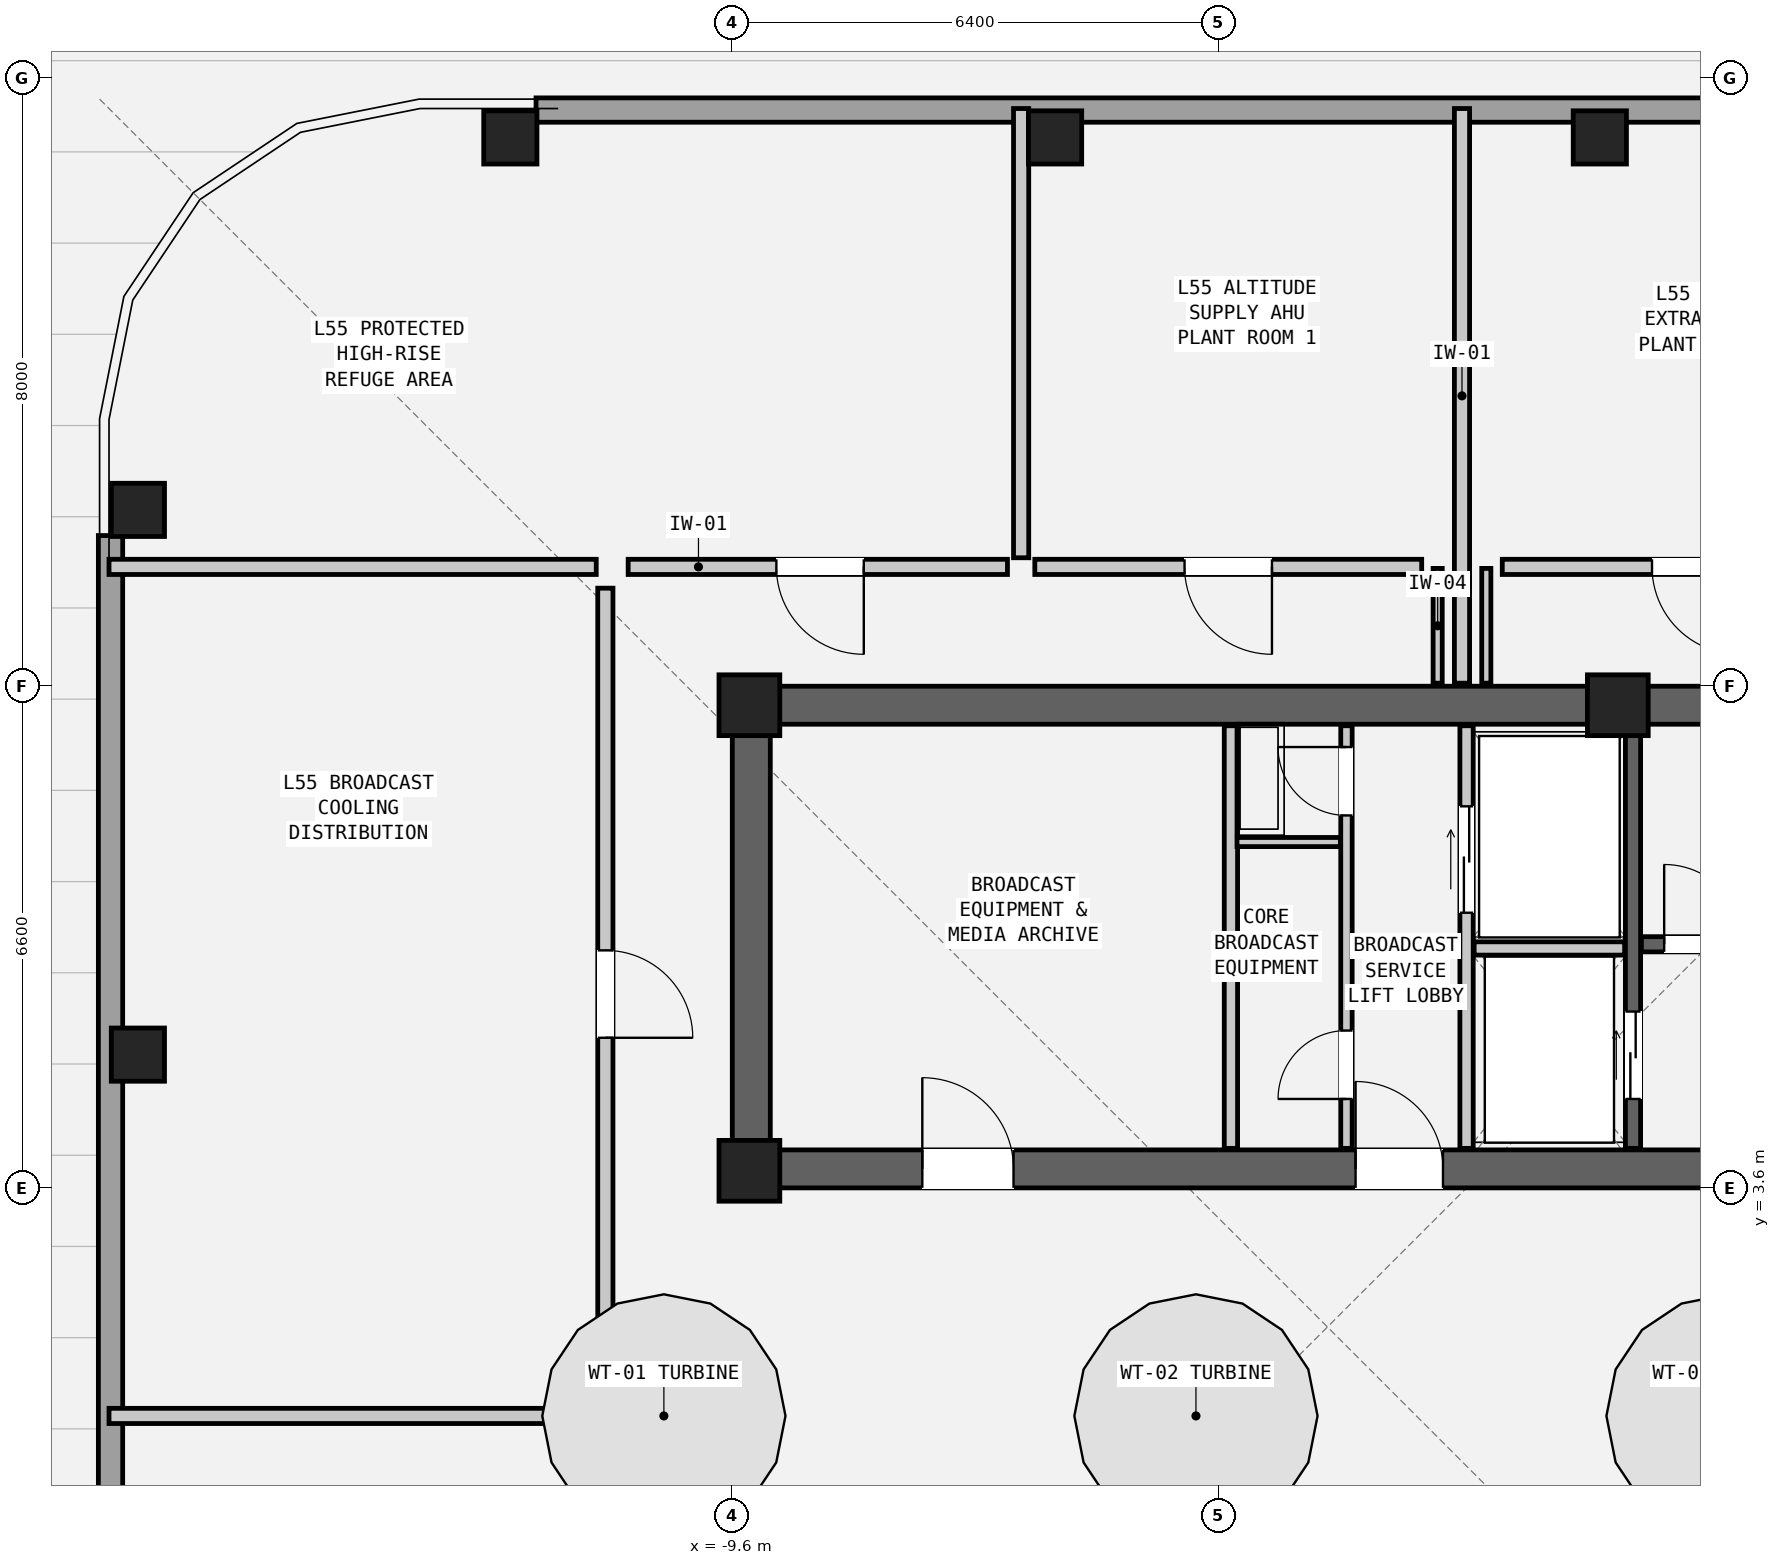
"""IFC4 building model, lengths in metres.
Left out: names, types, materials, properties, quantities, classifications, styles, units other than length and angle.
Written with IfcOpenShell. Run it as: python <this file> out.ifc"""

import sys

from ifc_helpers import new_model, si_unit, direction, frame, frame_2d, origin, origin_2d, place, context, subcontext, project, spatial, rectangle, hollow_rectangle, extrude, element, fill, save


model = new_model("IFC4")
c1 = context("Model", 3, precision=1e-05, world=origin(), true_north=direction((0.0, 1.0)))
c2 = subcontext(c1, "Body", "Model", "MODEL_VIEW")
j1 = project(units=[si_unit("LENGTHUNIT", "METRE"), si_unit("PLANEANGLEUNIT", "RADIAN")], contexts=[c1])
p1 = place(None, origin())
s1 = spatial("IfcSite", under=j1, at=p1, CompositionType="ELEMENT")
p2 = place(p1, origin())
s2 = spatial("IfcBuilding", under=s1, at=p2, CompositionType="ELEMENT")
p3 = place(p2, frame((0.0, 0.0, 187.95)))
s3 = spatial("IfcBuildingStorey", under=s2, at=p3, CompositionType="ELEMENT", Elevation=187.95)
p4 = place(p3, frame((-9.6, 9.95, 0.0), z_axis=(0.0, 0.0, 1.0), x_axis=(1.0, 0.0, 0.0)))
e1 = element("IfcWall", 1, at=p4, inside=s3, PredefinedType="SHEAR", context=c2, shape_type="SweptSolid", body=[
    extrude(rectangle(XDim=19.2, YDim=0.5, at=frame_2d((9.6, 0.0))), origin(), (0.0, 0.0, 1.0), 3.6),
])
p5 = place(p3, frame((-9.6, 3.85, 0.0), z_axis=(0.0, 0.0, 1.0), x_axis=(1.0, 0.0, 0.0)))
e2 = element("IfcWall", 2, at=p5, inside=s3, PredefinedType="SHEAR", context=c2, shape_type="SweptSolid", body=[
    extrude(rectangle(XDim=19.2, YDim=0.5, at=frame_2d((9.6, 0.0))), origin(), (0.0, 0.0, 1.0), 3.6),
])
p6 = place(p5, frame((14.2, 0.0, 0.0)))
e3 = element("IfcOpeningElement", 3, at=p6, cuts=e2, PredefinedType="OPENING", context=c2, shape_type="SweptSolid", body=[
    extrude(rectangle(XDim=1.1, YDim=2.08, at=frame_2d((0.55, 1.04))), frame((0.0, 0.262, 0.0), z_axis=(0.0, -1.0, 0.0), x_axis=(1.0, 0.0, 0.0)), (0.0, 0.0, 1.0), 0.524),
])
p7 = place(p5, frame((8.2, 0.0, 0.0)))
e4 = element("IfcOpeningElement", 4, at=p7, cuts=e2, PredefinedType="OPENING", context=c2, shape_type="SweptSolid", body=[
    extrude(rectangle(XDim=1.15, YDim=2.1, at=frame_2d((0.575, 1.05))), frame((0.0, 0.262, 0.0), z_axis=(0.0, -1.0, 0.0), x_axis=(1.0, 0.0, 0.0)), (0.0, 0.0, 1.0), 0.524),
])
p8 = place(p5, frame((2.5, 0.0, 0.0)))
e5 = element("IfcOpeningElement", 5, at=p8, cuts=e2, PredefinedType="OPENING", context=c2, shape_type="SweptSolid", body=[
    extrude(rectangle(XDim=1.2, YDim=2.1, at=frame_2d((0.6, 1.05))), frame((0.0, 0.262, 0.0), z_axis=(0.0, -1.0, 0.0), x_axis=(1.0, 0.0, 0.0)), (0.0, 0.0, 1.0), 0.524),
])
p9 = place(p3, frame((-9.35, 3.6, 0.0), z_axis=(0.0, 0.0, 1.0), x_axis=(0.0, 1.0, 0.0)))
e6 = element("IfcWall", 6, at=p9, inside=s3, PredefinedType="SHEAR", context=c2, shape_type="SweptSolid", body=[
    extrude(rectangle(XDim=6.6, YDim=0.5, at=frame_2d((3.3, 0.0))), origin(), (0.0, 0.0, 1.0), 3.6),
])
for number, where, z_axis, x_axis in (
    (7, (1.813, 17.42, 0.0), (0.0, 0.0, 1.0), (1.0, 0.0, 0.0)),
    (8, (-5.353, 17.42, 0.0), (0.0, 0.0, 1.0), (1.0, 0.0, 0.0)),
    (9, (-12.52, 17.42, 0.0), (0.0, 0.0, 1.0), (1.0, 0.0, 0.0)),
    (10, (-17.42, 12.52, 0.0), (0.0, 0.0, 1.0), (0.0, 1.0, 0.0)),
    (11, (-17.42, 5.353, 0.0), (0.0, 0.0, 1.0), (0.0, 1.0, 0.0)),
):
    element("IfcColumn", number, at=place(p3, frame(where, z_axis=z_axis, x_axis=x_axis)), inside=s3, PredefinedType="COLUMN", context=c2, shape_type="SweptSolid", body=[
        extrude(hollow_rectangle(XDim=0.7, YDim=0.7, WallThickness=0.045, at=origin_2d()), origin(), (0.0, 0.0, 1.0), 3.6),
    ])
for number, where, z_axis, x_axis in (
    (12, (-9.375, 9.95, 0.0), (0.0, 0.0, 1.0), (1.0, 0.0, 0.0)),
    (13, (2.05, 9.95, 0.0), (0.0, 0.0, 1.0), (1.0, 0.0, 0.0)),
    (14, (-9.375, 3.825, 0.0), (0.0, 0.0, 1.0), (1.0, 0.0, 0.0)),
):
    element("IfcColumn", number, at=place(p3, frame(where, z_axis=z_axis, x_axis=x_axis)), inside=s3, PredefinedType="COLUMN", context=c2, shape_type="SweptSolid", body=[
        extrude(rectangle(XDim=0.8, YDim=0.8, at=origin_2d()), origin(), (0.0, 0.0, 1.0), 3.6),
    ])
for number, where, z_axis, x_axis in (
    (15, (-12.182, 17.78, 0.0), (0.0, 0.0, 1.0), (1.0, 0.0, 0.0)),
    (16, (-17.78, -8.642, 0.0), (0.0, 0.0, 1.0), (0.0, 1.0, 0.0)),
):
    element("IfcWall", number, at=place(p3, frame(where, z_axis=z_axis, x_axis=x_axis)), inside=s3, PredefinedType="SOLIDWALL", context=c2, shape_type="SweptSolid", body=[
        extrude(rectangle(XDim=20.824, YDim=0.32, at=frame_2d((10.412, 0.0))), origin(), (0.0, 0.0, 1.0), 2.182),
    ])
p10 = place(p3, frame((2.36, 6.805, 0.0), z_axis=(0.0, 0.0, 1.0), x_axis=(1.0, 0.0, 0.0)))
e17 = element("IfcWall", 17, at=p10, inside=s3, PredefinedType="SHEAR", context=c2, shape_type="SweptSolid", body=[
    extrude(rectangle(XDim=6.72, YDim=0.2, at=frame_2d((3.36, 0.0))), origin(), (0.0, 0.0, 1.0), 3.32),
])
p11 = place(p10, frame((0.3, 0.0, 0.0)))
e18 = element("IfcOpeningElement", 18, at=p11, cuts=e17, PredefinedType="OPENING", context=c2, shape_type="SweptSolid", body=[
    extrude(rectangle(XDim=1.05, YDim=2.08, at=frame_2d((0.525, 1.04))), frame((0.0, 0.112, 0.0), z_axis=(0.0, -1.0, 0.0), x_axis=(1.0, 0.0, 0.0)), (0.0, 0.0, 1.0), 0.224),
])
p12 = place(p3, frame((2.25, 4.12, 0.0), z_axis=(0.0, 0.0, 1.0), x_axis=(0.0, 1.0, 0.0)))
e19 = element("IfcWall", 19, at=p12, inside=s3, PredefinedType="SHEAR", context=c2, shape_type="SweptSolid", body=[
    extrude(rectangle(XDim=5.56, YDim=0.2, at=frame_2d((2.78, 0.0))), origin(), (0.0, 0.0, 1.0), 3.32),
])
p13 = place(p12, frame((0.65, 0.0, 0.0)))
e20 = element("IfcOpeningElement", 20, at=p13, cuts=e19, PredefinedType="OPENING", context=c2, shape_type="SweptSolid", body=[
    extrude(rectangle(XDim=1.15, YDim=2.08, at=frame_2d((0.575, 1.04))), frame((0.0, 0.112, 0.0), z_axis=(0.0, -1.0, 0.0), x_axis=(1.0, 0.0, 0.0)), (0.0, 0.0, 1.0), 0.224),
])
p14 = place(p3, frame((0.06, 4.12, 0.0), z_axis=(0.0, 0.0, 1.0), x_axis=(0.0, 1.0, 0.0)))
e21 = element("IfcWall", 21, at=p14, inside=s3, PredefinedType="PARTITIONING", context=c2, shape_type="SweptSolid", body=[
    extrude(rectangle(XDim=5.56, YDim=0.175, at=frame_2d((2.78, 0.0))), origin(), (0.0, 0.0, 1.0), 3.32),
])
p15 = place(p14, frame((3.1, 0.0, 0.0)))
e22 = element("IfcOpeningElement", 22, at=p15, cuts=e21, PredefinedType="OPENING", context=c2, shape_type="SweptSolid", body=[
    extrude(rectangle(XDim=1.4, YDim=2.12, at=frame_2d((0.7, 1.06))), frame((0.0, 0.1, 0.0), z_axis=(0.0, -1.0, 0.0), x_axis=(1.0, 0.0, 0.0)), (0.0, 0.0, 1.0), 0.199),
])
p16 = place(p3, frame((0.16, 6.75, 0.0), z_axis=(0.0, 0.0, 1.0), x_axis=(1.0, 0.0, 0.0)))
e23 = element("IfcWall", 23, at=p16, inside=s3, PredefinedType="PARTITIONING", context=c2, shape_type="SweptSolid", body=[
    extrude(rectangle(XDim=1.98, YDim=0.175, at=frame_2d((0.99, 0.0))), origin(), (0.0, 0.0, 1.0), 3.32),
])
p17 = place(p3, frame((-3.04, 4.12, 0.0), z_axis=(0.0, 0.0, 1.0), x_axis=(0.0, 1.0, 0.0)))
e24 = element("IfcWall", 24, at=p17, inside=s3, PredefinedType="PARTITIONING", context=c2, shape_type="SweptSolid", body=[
    extrude(rectangle(XDim=5.56, YDim=0.175, at=frame_2d((2.78, 0.0))), origin(), (0.0, 0.0, 1.0), 3.32),
])
p18 = place(p3, frame((-1.52, 4.12, 0.0), z_axis=(0.0, 0.0, 1.0), x_axis=(0.0, 1.0, 0.0)))
e25 = element("IfcWall", 25, at=p18, inside=s3, PredefinedType="PARTITIONING", context=c2, shape_type="SweptSolid", body=[
    extrude(rectangle(XDim=5.56, YDim=0.15, at=frame_2d((2.78, 0.0))), origin(), (0.0, 0.0, 1.0), 3.32),
])
p19 = place(p18, frame((4.38, 0.0, 0.0)))
e26 = element("IfcOpeningElement", 26, at=p19, cuts=e25, PredefinedType="OPENING", context=c2, shape_type="SweptSolid", body=[
    extrude(rectangle(XDim=0.9, YDim=2.05, at=frame_2d((0.45, 1.025))), frame((0.0, 0.087, 0.0), z_axis=(0.0, -1.0, 0.0), x_axis=(1.0, 0.0, 0.0)), (0.0, 0.0, 1.0), 0.174),
])
p20 = place(p18, frame((0.65, 0.0, 0.0)))
e27 = element("IfcOpeningElement", 27, at=p20, cuts=e25, PredefinedType="OPENING", context=c2, shape_type="SweptSolid", body=[
    extrude(rectangle(XDim=0.9, YDim=2.05, at=frame_2d((0.45, 1.025))), frame((0.0, 0.087, 0.0), z_axis=(0.0, -1.0, 0.0), x_axis=(1.0, 0.0, 0.0)), (0.0, 0.0, 1.0), 0.174),
])
p21 = place(p3, frame((-2.96, 8.15, 0.0), z_axis=(0.0, 0.0, 1.0), x_axis=(1.0, 0.0, 0.0)))
e28 = element("IfcWall", 28, at=p21, inside=s3, PredefinedType="PARTITIONING", context=c2, shape_type="SweptSolid", body=[
    extrude(rectangle(XDim=1.36, YDim=0.12, at=frame_2d((0.68, 0.0))), origin(), (0.0, 0.0, 1.0), 3.32),
])
p22 = place(p3, frame((0.0, 10.24, 0.0), z_axis=(0.0, 0.0, 1.0), x_axis=(0.0, 1.0, 0.0)))
e29 = element("IfcWall", 29, at=p22, inside=s3, PredefinedType="PARTITIONING", context=c2, shape_type="SweptSolid", body=[
    extrude(rectangle(XDim=7.56, YDim=0.2, at=frame_2d((3.78, 0.0))), origin(), (0.0, 0.0, 1.0), 2.538),
])
for number, where, z_axis, x_axis in (
    (30, (-0.32, 10.24, 0.0), (0.0, 0.0, 1.0), (0.0, 1.0, 0.0)),
    (31, (0.32, 10.24, 0.0), (0.0, 0.0, 1.0), (0.0, 1.0, 0.0)),
):
    element("IfcWall", number, at=place(p3, frame(where, z_axis=z_axis, x_axis=x_axis)), inside=s3, PredefinedType="PARTITIONING", context=c2, shape_type="SweptSolid", body=[
        extrude(rectangle(XDim=1.51, YDim=0.12, at=frame_2d((0.755, 0.0))), origin(), (0.0, 0.0, 1.0), 2.538),
    ])
p23 = place(p3, frame((-5.98, 11.77, 0.0), z_axis=(0.0, 0.0, 1.0), x_axis=(-1.0, 0.0, 0.0)))
e32 = element("IfcWall", 32, at=p23, inside=s3, PredefinedType="PARTITIONING", context=c2, shape_type="SweptSolid", body=[
    extrude(rectangle(XDim=4.99, YDim=0.2, at=frame_2d((2.495, 0.0))), origin(), (0.0, 0.0, 1.0), 3.32),
])
p24 = place(p23, frame((1.89, 0.0, 0.0)))
e33 = element("IfcOpeningElement", 33, at=p24, cuts=e32, PredefinedType="OPENING", context=c2, shape_type="SweptSolid", body=[
    extrude(rectangle(XDim=1.15, YDim=2.1, at=frame_2d((0.575, 1.05))), frame((0.0, 0.112, 0.0), z_axis=(0.0, -1.0, 0.0), x_axis=(1.0, 0.0, 0.0)), (0.0, 0.0, 1.0), 0.224),
])
p25 = place(p3, frame((-5.8, 11.89, 0.0), z_axis=(0.0, 0.0, 1.0), x_axis=(0.0, 1.0, 0.0)))
e34 = element("IfcWall", 34, at=p25, inside=s3, PredefinedType="PARTITIONING", context=c2, shape_type="SweptSolid", body=[
    extrude(rectangle(XDim=5.91, YDim=0.2, at=frame_2d((2.955, 0.0))), origin(), (0.0, 0.0, 1.0), 2.538),
])
p26 = place(p3, frame((-0.53, 11.77, 0.0), z_axis=(0.0, 0.0, 1.0), x_axis=(-1.0, 0.0, 0.0)))
e35 = element("IfcWall", 35, at=p26, inside=s3, PredefinedType="PARTITIONING", context=c2, shape_type="SweptSolid", body=[
    extrude(rectangle(XDim=5.09, YDim=0.2, at=frame_2d((2.545, 0.0))), origin(), (0.0, 0.0, 1.0), 3.32),
])
p27 = place(p26, frame((1.97, 0.0, 0.0)))
e36 = element("IfcOpeningElement", 36, at=p27, cuts=e35, PredefinedType="OPENING", context=c2, shape_type="SweptSolid", body=[
    extrude(rectangle(XDim=1.15, YDim=2.1, at=frame_2d((0.575, 1.05))), frame((0.0, 0.112, 0.0), z_axis=(0.0, -1.0, 0.0), x_axis=(1.0, 0.0, 0.0)), (0.0, 0.0, 1.0), 0.224),
])
p28 = place(p3, frame((5.62, 11.77, 0.0), z_axis=(0.0, 0.0, 1.0), x_axis=(-1.0, 0.0, 0.0)))
e37 = element("IfcWall", 37, at=p28, inside=s3, PredefinedType="PARTITIONING", context=c2, shape_type="SweptSolid", body=[
    extrude(rectangle(XDim=5.09, YDim=0.2, at=frame_2d((2.545, 0.0))), origin(), (0.0, 0.0, 1.0), 3.32),
])
p29 = place(p28, frame((1.97, 0.0, 0.0)))
e38 = element("IfcOpeningElement", 38, at=p29, cuts=e37, PredefinedType="OPENING", context=c2, shape_type="SweptSolid", body=[
    extrude(rectangle(XDim=1.15, YDim=2.1, at=frame_2d((0.575, 1.05))), frame((0.0, 0.112, 0.0), z_axis=(0.0, -1.0, 0.0), x_axis=(1.0, 0.0, 0.0)), (0.0, 0.0, 1.0), 0.224),
])
p30 = place(p3, frame((-17.8, 11.77, 0.0), z_axis=(0.0, 0.0, 1.0), x_axis=(1.0, 0.0, 0.0)))
e39 = element("IfcWall", 39, at=p30, inside=s3, PredefinedType="PARTITIONING", context=c2, shape_type="SweptSolid", body=[
    extrude(rectangle(XDim=6.41, YDim=0.2, at=frame_2d((3.205, 0.0))), origin(), (0.0, 0.0, 1.0), 3.32),
])
p31 = place(p3, frame((-17.8, 0.6, 0.0), z_axis=(0.0, 0.0, 1.0), x_axis=(1.0, 0.0, 0.0)))
e40 = element("IfcWall", 40, at=p31, inside=s3, PredefinedType="PARTITIONING", context=c2, shape_type="SweptSolid", body=[
    extrude(rectangle(XDim=6.41, YDim=0.2, at=frame_2d((3.205, 0.0))), origin(), (0.0, 0.0, 1.0), 2.538),
])
p32 = place(p3, frame((-11.27, 0.39, 0.0), z_axis=(0.0, 0.0, 1.0), x_axis=(0.0, -1.0, 0.0)))
e41 = element("IfcWall", 41, at=p32, inside=s3, PredefinedType="PARTITIONING", context=c2, shape_type="SweptSolid", body=[
    extrude(rectangle(XDim=10.68, YDim=0.2, at=frame_2d((5.34, 0.0))), origin(), (0.0, 0.0, 1.0), 3.32),
])
p33 = place(p32, frame((1.561, 0.0, 0.0)))
e42 = element("IfcOpeningElement", 42, at=p33, cuts=e41, PredefinedType="OPENING", context=c2, shape_type="SweptSolid", body=[
    extrude(rectangle(XDim=1.15, YDim=2.1, at=frame_2d((0.575, 1.05))), frame((0.0, 0.112, 0.0), z_axis=(0.0, -1.0, 0.0), x_axis=(1.0, 0.0, 0.0)), (0.0, 0.0, 1.0), 0.224),
])
p34 = place(p3, frame((-11.27, 11.49, 0.0), z_axis=(0.0, 0.0, 1.0), x_axis=(0.0, -1.0, 0.0)))
e43 = element("IfcWall", 43, at=p34, inside=s3, PredefinedType="PARTITIONING", context=c2, shape_type="SweptSolid", body=[
    extrude(rectangle(XDim=10.68, YDim=0.2, at=frame_2d((5.34, 0.0))), origin(), (0.0, 0.0, 1.0), 3.32),
])
p35 = place(p34, frame((4.765, 0.0, 0.0)))
e44 = element("IfcOpeningElement", 44, at=p35, cuts=e43, PredefinedType="OPENING", context=c2, shape_type="SweptSolid", body=[
    extrude(rectangle(XDim=1.15, YDim=2.1, at=frame_2d((0.575, 1.05))), frame((0.0, 0.112, 0.0), z_axis=(0.0, -1.0, 0.0), x_axis=(1.0, 0.0, 0.0)), (0.0, 0.0, 1.0), 0.224),
])
p36 = place(p11, origin())
e45 = element("IfcDoor", 45, at=p36, inside=s3, OperationType="SINGLE_SWING_LEFT", PredefinedType="DOOR", context=c2, shape_type="SweptSolid", body=[
    extrude(rectangle(XDim=1.05, YDim=2.08, at=frame_2d((0.525, 1.04))), frame((0.0, 0.025, 0.0), z_axis=(0.0, -1.0, 0.0), x_axis=(1.0, 0.0, 0.0)), (0.0, 0.0, 1.0), 0.05),
])
fill(e18, e45)
p37 = place(p13, origin())
e46 = element("IfcDoor", 46, at=p37, inside=s3, OperationType="DOUBLE_DOOR_SLIDING", PredefinedType="DOOR", context=c2, shape_type="SweptSolid", body=[
    extrude(rectangle(XDim=1.15, YDim=2.08, at=frame_2d((0.575, 1.04))), frame((0.0, 0.025, 0.0), z_axis=(0.0, -1.0, 0.0), x_axis=(1.0, 0.0, 0.0)), (0.0, 0.0, 1.0), 0.05),
])
fill(e20, e46)
p38 = place(p15, origin())
e47 = element("IfcDoor", 47, at=p38, inside=s3, OperationType="DOUBLE_DOOR_SLIDING", PredefinedType="DOOR", context=c2, shape_type="SweptSolid", body=[
    extrude(rectangle(XDim=1.4, YDim=2.12, at=frame_2d((0.7, 1.06))), frame((0.0, 0.025, 0.0), z_axis=(0.0, -1.0, 0.0), x_axis=(1.0, 0.0, 0.0)), (0.0, 0.0, 1.0), 0.05),
])
fill(e22, e47)
p39 = place(p7, origin())
e48 = element("IfcDoor", 48, at=p39, inside=s3, OperationType="SINGLE_SWING_LEFT", PredefinedType="DOOR", context=c2, shape_type="SweptSolid", body=[
    extrude(rectangle(XDim=1.15, YDim=2.1, at=frame_2d((0.575, 1.05))), frame((0.0, 0.025, 0.0), z_axis=(0.0, -1.0, 0.0), x_axis=(1.0, 0.0, 0.0)), (0.0, 0.0, 1.0), 0.05),
])
fill(e4, e48)
p40 = place(p19, origin())
e49 = element("IfcDoor", 49, at=p40, inside=s3, OperationType="SINGLE_SWING_RIGHT", PredefinedType="DOOR", context=c2, shape_type="SweptSolid", body=[
    extrude(rectangle(XDim=0.9, YDim=2.05, at=frame_2d((0.45, 1.025))), frame((0.0, 0.025, 0.0), z_axis=(0.0, -1.0, 0.0), x_axis=(1.0, 0.0, 0.0)), (0.0, 0.0, 1.0), 0.05),
])
fill(e26, e49)
p41 = place(p20, origin())
e50 = element("IfcDoor", 50, at=p41, inside=s3, OperationType="SINGLE_SWING_LEFT", PredefinedType="DOOR", context=c2, shape_type="SweptSolid", body=[
    extrude(rectangle(XDim=0.9, YDim=2.05, at=frame_2d((0.45, 1.025))), frame((0.0, 0.025, 0.0), z_axis=(0.0, -1.0, 0.0), x_axis=(1.0, 0.0, 0.0)), (0.0, 0.0, 1.0), 0.05),
])
fill(e27, e50)
p42 = place(p8, origin())
e51 = element("IfcDoor", 51, at=p42, inside=s3, OperationType="SINGLE_SWING_LEFT", PredefinedType="DOOR", context=c2, shape_type="SweptSolid", body=[
    extrude(rectangle(XDim=1.2, YDim=2.1, at=frame_2d((0.6, 1.05))), frame((0.0, 0.025, 0.0), z_axis=(0.0, -1.0, 0.0), x_axis=(1.0, 0.0, 0.0)), (0.0, 0.0, 1.0), 0.05),
])
fill(e5, e51)
p43 = place(p24, origin())
e52 = element("IfcDoor", 52, at=p43, inside=s3, OperationType="SINGLE_SWING_LEFT", PredefinedType="DOOR", context=c2, shape_type="SweptSolid", body=[
    extrude(rectangle(XDim=1.15, YDim=2.1, at=frame_2d((0.575, 1.05))), frame((0.0, 0.025, 0.0), z_axis=(0.0, -1.0, 0.0), x_axis=(1.0, 0.0, 0.0)), (0.0, 0.0, 1.0), 0.05),
])
fill(e33, e52)
p44 = place(p27, origin())
e53 = element("IfcDoor", 53, at=p44, inside=s3, OperationType="SINGLE_SWING_LEFT", PredefinedType="DOOR", context=c2, shape_type="SweptSolid", body=[
    extrude(rectangle(XDim=1.15, YDim=2.1, at=frame_2d((0.575, 1.05))), frame((0.0, 0.025, 0.0), z_axis=(0.0, -1.0, 0.0), x_axis=(1.0, 0.0, 0.0)), (0.0, 0.0, 1.0), 0.05),
])
fill(e36, e53)
p45 = place(p29, origin())
e54 = element("IfcDoor", 54, at=p45, inside=s3, OperationType="SINGLE_SWING_LEFT", PredefinedType="DOOR", context=c2, shape_type="SweptSolid", body=[
    extrude(rectangle(XDim=1.15, YDim=2.1, at=frame_2d((0.575, 1.05))), frame((0.0, 0.025, 0.0), z_axis=(0.0, -1.0, 0.0), x_axis=(1.0, 0.0, 0.0)), (0.0, 0.0, 1.0), 0.05),
])
fill(e38, e54)
p46 = place(p35, origin())
e55 = element("IfcDoor", 55, at=p46, inside=s3, OperationType="SINGLE_SWING_RIGHT", PredefinedType="DOOR", context=c2, shape_type="SweptSolid", body=[
    extrude(rectangle(XDim=1.15, YDim=2.1, at=frame_2d((0.575, 1.05))), frame((0.0, 0.025, 0.0), z_axis=(0.0, -1.0, 0.0), x_axis=(1.0, 0.0, 0.0)), (0.0, 0.0, 1.0), 0.05),
])
fill(e44, e55)
save(model, sys.argv[1])
